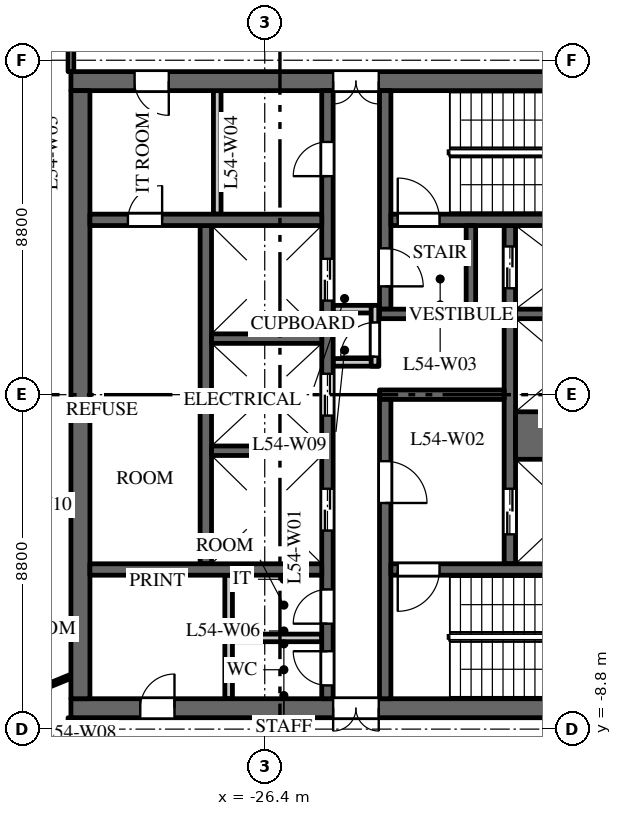
"""IFC4 building model, lengths in metres.
Left out: names, types, materials, properties, quantities, classifications, styles, units other than length and angle.
Written with IfcOpenShell. Run it as: python <this file> out.ifc"""

import sys

from ifc_helpers import new_model, si_unit, direction, frame, frame_2d, origin, place, context, subcontext, project, spatial, rectangle, extrude, element, fill, save


model = new_model("IFC4")
c1 = context("Model", 3, precision=1e-05, world=origin(), true_north=direction((0.0, 1.0)))
c2 = subcontext(c1, "Body", "Model", "MODEL_VIEW")
j1 = project(units=[si_unit("LENGTHUNIT", "METRE"), si_unit("PLANEANGLEUNIT", "RADIAN")], contexts=[c1])
p1 = place(None, origin())
s1 = spatial("IfcSite", under=j1, at=p1, CompositionType="ELEMENT")
p2 = place(p1, origin())
s2 = spatial("IfcBuilding", under=s1, at=p2, CompositionType="ELEMENT")
p3 = place(p2, frame((0.0, 0.0, 257.5)))
s3 = spatial("IfcBuildingStorey", under=s2, at=p3, CompositionType="ELEMENT", Elevation=257.5)
p4 = place(p3, frame((-16.5, 8.25, 0.0), z_axis=(0.0, 0.0, 1.0), x_axis=(-1.0, 0.0, 0.0)))
e1 = element("IfcWall", 1, at=p4, inside=s3, PredefinedType="SHEAR", context=c2, shape_type="SweptSolid", body=[
    extrude(rectangle(XDim=15.0, YDim=0.5, at=frame_2d((7.5, 0.0))), origin(), (0.0, 0.0, 1.0), 3.7),
])
p5 = place(p4, frame((6.9, 0.0, 0.0)))
e2 = element("IfcOpeningElement", 2, at=p5, cuts=e1, PredefinedType="OPENING", context=c2, shape_type="SweptSolid", body=[
    extrude(rectangle(XDim=1.2, YDim=2.1, at=frame_2d((0.6, 1.05))), frame((0.0, 0.26, 0.0), z_axis=(0.0, -1.0, 0.0), x_axis=(1.0, 0.0, 0.0)), (0.0, 0.0, 1.0), 0.52),
])
p6 = place(p4, frame((12.425, 0.0, 0.0)))
e3 = element("IfcOpeningElement", 3, at=p6, cuts=e1, PredefinedType="OPENING", context=c2, shape_type="SweptSolid", body=[
    extrude(rectangle(XDim=0.9, YDim=2.1, at=frame_2d((0.45, 1.05))), frame((0.0, 0.26, 0.0), z_axis=(0.0, -1.0, 0.0), x_axis=(1.0, 0.0, 0.0)), (0.0, 0.0, 1.0), 0.52),
])
p7 = place(p3, frame((-16.5, -8.25, 0.0), z_axis=(0.0, 0.0, 1.0), x_axis=(-1.0, 0.0, 0.0)))
e4 = element("IfcWall", 4, at=p7, inside=s3, PredefinedType="SHEAR", context=c2, shape_type="SweptSolid", body=[
    extrude(rectangle(XDim=15.0, YDim=0.5, at=frame_2d((7.5, 0.0))), origin(), (0.0, 0.0, 1.0), 3.7),
])
p8 = place(p7, frame((6.9, 0.0, 0.0)))
e5 = element("IfcOpeningElement", 5, at=p8, cuts=e4, PredefinedType="OPENING", context=c2, shape_type="SweptSolid", body=[
    extrude(rectangle(XDim=1.2, YDim=2.1, at=frame_2d((0.6, 1.05))), frame((0.0, 0.26, 0.0), z_axis=(0.0, -1.0, 0.0), x_axis=(1.0, 0.0, 0.0)), (0.0, 0.0, 1.0), 0.52),
])
p9 = place(p7, frame((12.275, 0.0, 0.0)))
e6 = element("IfcOpeningElement", 6, at=p9, cuts=e4, PredefinedType="OPENING", context=c2, shape_type="SweptSolid", body=[
    extrude(rectangle(XDim=0.9, YDim=2.1, at=frame_2d((0.45, 1.05))), frame((0.0, 0.26, 0.0), z_axis=(0.0, -1.0, 0.0), x_axis=(1.0, 0.0, 0.0)), (0.0, 0.0, 1.0), 0.52),
])
p10 = place(p3, frame((-27.95, -4.45, 0.0), z_axis=(0.0, 0.0, 1.0), x_axis=(0.0, 1.0, 0.0)))
e7 = element("IfcWall", 7, at=p10, inside=s3, PredefinedType="SHEAR", context=c2, shape_type="SweptSolid", body=[
    extrude(rectangle(XDim=8.9, YDim=0.3, at=frame_2d((4.45, 0.0))), origin(), (0.0, 0.0, 1.0), 3.7),
])
p11 = place(p3, frame((-19.95, -4.45, 0.0), z_axis=(0.0, 0.0, 1.0), x_axis=(0.0, 1.0, 0.0)))
e8 = element("IfcWall", 8, at=p11, inside=s3, PredefinedType="SHEAR", context=c2, shape_type="SweptSolid", body=[
    extrude(rectangle(XDim=8.9, YDim=0.3, at=frame_2d((4.45, 0.0))), origin(), (0.0, 0.0, 1.0), 3.7),
])
p12 = place(p11, frame((0.775, 0.0, 0.0)))
e9 = element("IfcOpeningElement", 9, at=p12, cuts=e8, PredefinedType="OPENING", context=c2, shape_type="SweptSolid", body=[
    extrude(rectangle(XDim=1.2, YDim=2.1, at=frame_2d((0.6, 1.05))), frame((0.0, 0.16, 0.0), z_axis=(0.0, -1.0, 0.0), x_axis=(1.0, 0.0, 0.0)), (0.0, 0.0, 1.0), 0.32),
])
p13 = place(p11, frame((7.25, 0.0, 0.0)))
e10 = element("IfcOpeningElement", 10, at=p13, cuts=e8, PredefinedType="OPENING", context=c2, shape_type="SweptSolid", body=[
    extrude(rectangle(XDim=1.1, YDim=2.1, at=frame_2d((0.55, 1.05))), frame((0.0, 0.16, 0.0), z_axis=(0.0, -1.0, 0.0), x_axis=(1.0, 0.0, 0.0)), (0.0, 0.0, 1.0), 0.32),
])
p14 = place(p3, frame((-24.75, -8.0, 0.0), z_axis=(0.0, 0.0, 1.0), x_axis=(0.0, 1.0, 0.0)))
e11 = element("IfcWall", 11, at=p14, inside=s3, PredefinedType="SHEAR", context=c2, shape_type="SweptSolid", body=[
    extrude(rectangle(XDim=16.0, YDim=0.3, at=frame_2d((8.0, 0.0))), origin(), (0.0, 0.0, 1.0), 3.7),
])
p15 = place(p14, frame((4.425, 0.0, 0.0)))
e12 = element("IfcOpeningElement", 12, at=p15, cuts=e11, PredefinedType="OPENING", context=c2, shape_type="SweptSolid", body=[
    extrude(rectangle(XDim=1.1, YDim=2.1, at=frame_2d((0.55, 1.05))), frame((0.0, 0.16, 0.0), z_axis=(0.0, -1.0, 0.0), x_axis=(1.0, 0.0, 0.0)), (0.0, 0.0, 1.0), 0.32),
])
p16 = place(p14, frame((7.45, 0.0, 0.0)))
e13 = element("IfcOpeningElement", 13, at=p16, cuts=e11, PredefinedType="OPENING", context=c2, shape_type="SweptSolid", body=[
    extrude(rectangle(XDim=1.1, YDim=2.1, at=frame_2d((0.55, 1.05))), frame((0.0, 0.16, 0.0), z_axis=(0.0, -1.0, 0.0), x_axis=(1.0, 0.0, 0.0)), (0.0, 0.0, 1.0), 0.32),
])
p17 = place(p14, frame((10.475, 0.0, 0.0)))
e14 = element("IfcOpeningElement", 14, at=p17, cuts=e11, PredefinedType="OPENING", context=c2, shape_type="SweptSolid", body=[
    extrude(rectangle(XDim=1.1, YDim=2.1, at=frame_2d((0.55, 1.05))), frame((0.0, 0.16, 0.0), z_axis=(0.0, -1.0, 0.0), x_axis=(1.0, 0.0, 0.0)), (0.0, 0.0, 1.0), 0.32),
])
p18 = place(p14, frame((13.75, 0.0, 0.0)))
e15 = element("IfcOpeningElement", 15, at=p18, cuts=e11, PredefinedType="OPENING", context=c2, shape_type="SweptSolid", body=[
    extrude(rectangle(XDim=0.9, YDim=2.1, at=frame_2d((0.45, 1.05))), frame((0.0, 0.16, 0.0), z_axis=(0.0, -1.0, 0.0), x_axis=(1.0, 0.0, 0.0)), (0.0, 0.0, 1.0), 0.32),
])
p19 = place(p14, frame((1.975, 0.0, 0.0)))
e16 = element("IfcOpeningElement", 16, at=p19, cuts=e11, PredefinedType="OPENING", context=c2, shape_type="SweptSolid", body=[
    extrude(rectangle(XDim=0.9, YDim=2.1, at=frame_2d((0.45, 1.05))), frame((0.0, 0.16, 0.0), z_axis=(0.0, -1.0, 0.0), x_axis=(1.0, 0.0, 0.0)), (0.0, 0.0, 1.0), 0.32),
])
p20 = place(p14, frame((0.35, 0.0, 0.0)))
e17 = element("IfcOpeningElement", 17, at=p20, cuts=e11, PredefinedType="OPENING", context=c2, shape_type="SweptSolid", body=[
    extrude(rectangle(XDim=0.9, YDim=2.1, at=frame_2d((0.45, 1.05))), frame((0.0, 0.16, 0.0), z_axis=(0.0, -1.0, 0.0), x_axis=(1.0, 0.0, 0.0)), (0.0, 0.0, 1.0), 0.32),
])
p21 = place(p3, frame((-20.1, 0.0, 0.0), z_axis=(0.0, 0.0, 1.0), x_axis=(-1.0, 0.0, 0.0)))
e18 = element("IfcWall", 18, at=p21, inside=s3, PredefinedType="SHEAR", context=c2, shape_type="SweptSolid", body=[
    extrude(rectangle(XDim=3.28, YDim=0.25, at=frame_2d((1.64, 0.0))), origin(), (0.0, 0.0, 1.0), 3.7),
])
for number, where, z_axis, x_axis in (
    (19, (-23.4, 0.85, 0.0), (0.0, 0.0, 1.0), (-1.0, 0.0, 0.0)),
    (20, (-23.4, 2.25, 0.0), (0.0, 0.0, 1.0), (-1.0, 0.0, 0.0)),
):
    element("IfcWall", number, at=place(p3, frame(where, z_axis=z_axis, x_axis=x_axis)), inside=s3, PredefinedType="PARTITIONING", context=c2, shape_type="SweptSolid", body=[
        extrude(rectangle(XDim=1.2, YDim=0.2, at=frame_2d((0.6, 0.0))), origin(), (0.0, 0.0, 1.0), 3.7),
    ])
p22 = place(p3, frame((-23.5, 0.75, 0.0), z_axis=(0.0, 0.0, 1.0), x_axis=(0.0, 1.0, 0.0)))
e21 = element("IfcWall", 21, at=p22, inside=s3, PredefinedType="PARTITIONING", context=c2, shape_type="SweptSolid", body=[
    extrude(rectangle(XDim=1.6, YDim=0.2, at=frame_2d((0.8, 0.0))), origin(), (0.0, 0.0, 1.0), 3.7),
])
p23 = place(p22, frame((0.25, 0.0, 0.0)))
e22 = element("IfcOpeningElement", 22, at=p23, cuts=e21, PredefinedType="OPENING", context=c2, shape_type="SweptSolid", body=[
    extrude(rectangle(XDim=0.9, YDim=2.1, at=frame_2d((0.45, 1.05))), frame((0.0, 0.11, 0.0), z_axis=(0.0, -1.0, 0.0), x_axis=(1.0, 0.0, 0.0)), (0.0, 0.0, 1.0), 0.22),
])
p24 = place(p3, frame((-31.25, -8.0, 0.0), z_axis=(0.0, 0.0, 1.0), x_axis=(0.0, 1.0, 0.0)))
e23 = element("IfcWall", 23, at=p24, inside=s3, PredefinedType="SHEAR", context=c2, shape_type="SweptSolid", body=[
    extrude(rectangle(XDim=16.0, YDim=0.5, at=frame_2d((8.0, 0.0))), origin(), (0.0, 0.0, 1.0), 3.7),
])
p25 = place(p3, frame((-24.9, 4.6, 0.0), z_axis=(0.0, 0.0, 1.0), x_axis=(-1.0, 0.0, 0.0)))
e24 = element("IfcWall", 24, at=p25, inside=s3, PredefinedType="SHEAR", context=c2, shape_type="SweptSolid", body=[
    extrude(rectangle(XDim=6.1, YDim=0.3, at=frame_2d((3.05, 0.0))), origin(), (0.0, 0.0, 1.0), 3.7),
])
p26 = place(p25, frame((4.2, 0.0, 0.0)))
e25 = element("IfcOpeningElement", 25, at=p26, cuts=e24, PredefinedType="OPENING", context=c2, shape_type="SweptSolid", body=[
    extrude(rectangle(XDim=0.9, YDim=2.1, at=frame_2d((0.45, 1.05))), frame((0.0, 0.16, 0.0), z_axis=(0.0, -1.0, 0.0), x_axis=(1.0, 0.0, 0.0)), (0.0, 0.0, 1.0), 0.32),
])
for number, where, z_axis, x_axis in (
    (26, (-27.65, 4.75, 0.0), (0.0, 0.0, 1.0), (0.0, 1.0, 0.0)),
    (27, (-27.35, -8.0, 0.0), (0.0, 0.0, 1.0), (0.0, 1.0, 0.0)),
):
    element("IfcWall", number, at=place(p3, frame(where, z_axis=z_axis, x_axis=x_axis)), inside=s3, PredefinedType="PARTITIONING", context=c2, shape_type="SweptSolid", body=[
        extrude(rectangle(XDim=3.25, YDim=0.2, at=frame_2d((1.625, 0.0))), origin(), (0.0, 0.0, 1.0), 3.7),
    ])
p27 = place(p3, frame((-24.9, -6.4, 0.0), z_axis=(0.0, 0.0, 1.0), x_axis=(-1.0, 0.0, 0.0)))
e28 = element("IfcWall", 28, at=p27, inside=s3, PredefinedType="PARTITIONING", context=c2, shape_type="SweptSolid", body=[
    extrude(rectangle(XDim=2.35, YDim=0.2, at=frame_2d((1.175, 0.0))), origin(), (0.0, 0.0, 1.0), 3.7),
])
p28 = place(p3, frame((-24.9, -4.6, 0.0), z_axis=(0.0, 0.0, 1.0), x_axis=(-1.0, 0.0, 0.0)))
e29 = element("IfcWall", 29, at=p28, inside=s3, PredefinedType="SHEAR", context=c2, shape_type="SweptSolid", body=[
    extrude(rectangle(XDim=6.1, YDim=0.3, at=frame_2d((3.05, 0.0))), origin(), (0.0, 0.0, 1.0), 3.7),
])
p29 = place(p3, frame((-16.9, -1.075, 0.0), z_axis=(0.0, 0.0, 1.0), x_axis=(-1.0, 0.0, 0.0)))
e30 = element("IfcWall", 30, at=p29, inside=s3, PredefinedType="SHEAR", context=c2, shape_type="SweptSolid", body=[
    extrude(rectangle(XDim=2.9, YDim=1.25, at=frame_2d((1.45, 0.0))), origin(), (0.0, 0.0, 1.0), 3.7),
])
for number, where, z_axis, x_axis in (
    (31, (-16.9, 2.125, 0.0), (0.0, 0.0, 1.0), (-1.0, 0.0, 0.0)),
    (32, (-24.9, -1.475, 0.0), (0.0, 0.0, 1.0), (-1.0, 0.0, 0.0)),
    (33, (-24.9, 1.475, 0.0), (0.0, 0.0, 1.0), (-1.0, 0.0, 0.0)),
):
    element("IfcWall", number, at=place(p3, frame(where, z_axis=z_axis, x_axis=x_axis)), inside=s3, PredefinedType="SHEAR", context=c2, shape_type="SweptSolid", body=[
        extrude(rectangle(XDim=2.9, YDim=0.25, at=frame_2d((1.45, 0.0))), origin(), (0.0, 0.0, 1.0), 3.7),
    ])
p30 = place(p3, frame((-23.23, 2.25, 0.0), z_axis=(0.0, 0.0, 1.0), x_axis=(0.0, 1.0, 0.0)))
e34 = element("IfcWall", 34, at=p30, inside=s3, PredefinedType="SHEAR", context=c2, shape_type="SweptSolid", body=[
    extrude(rectangle(XDim=5.75, YDim=0.3, at=frame_2d((2.875, 0.0))), origin(), (0.0, 0.0, 1.0), 3.7),
])
p31 = place(p30, frame((0.6, 0.0, 0.0)))
e35 = element("IfcOpeningElement", 35, at=p31, cuts=e34, PredefinedType="OPENING", context=c2, shape_type="SweptSolid", body=[
    extrude(rectangle(XDim=1.0, YDim=2.1, at=frame_2d((0.5, 1.05))), frame((0.0, 0.16, 0.0), z_axis=(0.0, -1.0, 0.0), x_axis=(1.0, 0.0, 0.0)), (0.0, 0.0, 1.0), 0.32),
])
p32 = place(p3, frame((-23.23, -8.0, 0.0), z_axis=(0.0, 0.0, 1.0), x_axis=(0.0, 1.0, 0.0)))
e36 = element("IfcWall", 36, at=p32, inside=s3, PredefinedType="SHEAR", context=c2, shape_type="SweptSolid", body=[
    extrude(rectangle(XDim=7.875, YDim=0.3, at=frame_2d((3.938, 0.0))), origin(), (0.0, 0.0, 1.0), 3.7),
])
p33 = place(p32, frame((5.15, 0.0, 0.0)))
e37 = element("IfcOpeningElement", 37, at=p33, cuts=e36, PredefinedType="OPENING", context=c2, shape_type="SweptSolid", body=[
    extrude(rectangle(XDim=1.1, YDim=2.1, at=frame_2d((0.55, 1.05))), frame((0.0, 0.16, 0.0), z_axis=(0.0, -1.0, 0.0), x_axis=(1.0, 0.0, 0.0)), (0.0, 0.0, 1.0), 0.32),
])
p34 = place(p3, frame((-16.9, 4.6, 0.0), z_axis=(0.0, 0.0, 1.0), x_axis=(-1.0, 0.0, 0.0)))
e38 = element("IfcWall", 38, at=p34, inside=s3, PredefinedType="SHEAR", context=c2, shape_type="SweptSolid", body=[
    extrude(rectangle(XDim=6.18, YDim=0.3, at=frame_2d((3.09, 0.0))), origin(), (0.0, 0.0, 1.0), 3.7),
])
p35 = place(p34, frame((4.9, 0.0, 0.0)))
e39 = element("IfcOpeningElement", 39, at=p35, cuts=e38, PredefinedType="OPENING", context=c2, shape_type="SweptSolid", body=[
    extrude(rectangle(XDim=1.1, YDim=2.1, at=frame_2d((0.55, 1.05))), frame((0.0, 0.16, 0.0), z_axis=(0.0, -1.0, 0.0), x_axis=(1.0, 0.0, 0.0)), (0.0, 0.0, 1.0), 0.32),
])
p36 = place(p3, frame((-16.9, -4.6, 0.0), z_axis=(0.0, 0.0, 1.0), x_axis=(-1.0, 0.0, 0.0)))
e40 = element("IfcWall", 40, at=p36, inside=s3, PredefinedType="SHEAR", context=c2, shape_type="SweptSolid", body=[
    extrude(rectangle(XDim=6.18, YDim=0.3, at=frame_2d((3.09, 0.0))), origin(), (0.0, 0.0, 1.0), 3.7),
])
p37 = place(p36, frame((4.9, 0.0, 0.0)))
e41 = element("IfcOpeningElement", 41, at=p37, cuts=e40, PredefinedType="OPENING", context=c2, shape_type="SweptSolid", body=[
    extrude(rectangle(XDim=1.1, YDim=2.1, at=frame_2d((0.55, 1.05))), frame((0.0, 0.16, 0.0), z_axis=(0.0, -1.0, 0.0), x_axis=(1.0, 0.0, 0.0)), (0.0, 0.0, 1.0), 0.32),
])
p38 = place(p3, frame((-20.85, 2.125, 0.0), z_axis=(0.0, 0.0, 1.0), x_axis=(-1.0, 0.0, 0.0)))
e42 = element("IfcWall", 42, at=p38, inside=s3, PredefinedType="SHEAR", context=c2, shape_type="SweptSolid", body=[
    extrude(rectangle(XDim=2.53, YDim=0.25, at=frame_2d((1.265, 0.0))), origin(), (0.0, 0.0, 1.0), 3.7),
])
p39 = place(p3, frame((-20.975, 2.25, 0.0), z_axis=(0.0, 0.0, 1.0), x_axis=(0.0, 1.0, 0.0)))
e43 = element("IfcWall", 43, at=p39, inside=s3, PredefinedType="SHEAR", context=c2, shape_type="SweptSolid", body=[
    extrude(rectangle(XDim=2.2, YDim=0.25, at=frame_2d((1.1, 0.0))), origin(), (0.0, 0.0, 1.0), 3.7),
])
p40 = place(p3, frame((-34.234, -8.53, 0.0), z_axis=(0.0, 0.0, 1.0), x_axis=(0.925344112436, 0.379128307542, 0.0)))
e44 = element("IfcWall", 44, at=p40, inside=s3, PredefinedType="PARTITIONING", context=c2, shape_type="SweptSolid", body=[
    extrude(rectangle(XDim=2.954, YDim=0.1, at=frame_2d((1.477, 0.0))), origin(), (0.0, 0.0, 1.0), 3.0),
])
for number, where, z_axis, x_axis in (
    (45, (-31.5, -10.7, 0.0), (0.0, 0.0, 1.0), (0.0, 1.0, 0.0)),
    (46, (-31.5, 8.5, 0.0), (0.0, 0.0, 1.0), (0.0, 1.0, 0.0)),
):
    element("IfcWall", number, at=place(p3, frame(where, z_axis=z_axis, x_axis=x_axis)), inside=s3, PredefinedType="PARTITIONING", context=c2, shape_type="SweptSolid", body=[
        extrude(rectangle(XDim=2.2, YDim=0.15, at=frame_2d((1.1, 0.0))), origin(), (0.0, 0.0, 1.0), 3.7),
    ])
p41 = place(p12, origin())
e47 = element("IfcDoor", 47, at=p41, inside=s3, OperationType="DOUBLE_DOOR_SLIDING", PredefinedType="DOOR", context=c2, shape_type="SweptSolid", body=[
    extrude(rectangle(XDim=1.2, YDim=2.1, at=frame_2d((0.6, 1.05))), frame((0.0, 0.025, 0.0), z_axis=(0.0, -1.0, 0.0), x_axis=(1.0, 0.0, 0.0)), (0.0, 0.0, 1.0), 0.05),
])
fill(e9, e47)
p42 = place(p13, origin())
e48 = element("IfcDoor", 48, at=p42, inside=s3, OperationType="DOUBLE_DOOR_SLIDING", PredefinedType="DOOR", context=c2, shape_type="SweptSolid", body=[
    extrude(rectangle(XDim=1.1, YDim=2.1, at=frame_2d((0.55, 1.05))), frame((0.0, 0.025, 0.0), z_axis=(0.0, -1.0, 0.0), x_axis=(1.0, 0.0, 0.0)), (0.0, 0.0, 1.0), 0.05),
])
fill(e10, e48)
p43 = place(p15, origin())
e49 = element("IfcDoor", 49, at=p43, inside=s3, OperationType="DOUBLE_DOOR_SLIDING", PredefinedType="DOOR", context=c2, shape_type="SweptSolid", body=[
    extrude(rectangle(XDim=1.1, YDim=2.1, at=frame_2d((0.55, 1.05))), frame((0.0, 0.025, 0.0), z_axis=(0.0, -1.0, 0.0), x_axis=(1.0, 0.0, 0.0)), (0.0, 0.0, 1.0), 0.05),
])
fill(e12, e49)
p44 = place(p16, origin())
e50 = element("IfcDoor", 50, at=p44, inside=s3, OperationType="DOUBLE_DOOR_SLIDING", PredefinedType="DOOR", context=c2, shape_type="SweptSolid", body=[
    extrude(rectangle(XDim=1.1, YDim=2.1, at=frame_2d((0.55, 1.05))), frame((0.0, 0.025, 0.0), z_axis=(0.0, -1.0, 0.0), x_axis=(1.0, 0.0, 0.0)), (0.0, 0.0, 1.0), 0.05),
])
fill(e13, e50)
p45 = place(p17, origin())
e51 = element("IfcDoor", 51, at=p45, inside=s3, OperationType="DOUBLE_DOOR_SLIDING", PredefinedType="DOOR", context=c2, shape_type="SweptSolid", body=[
    extrude(rectangle(XDim=1.1, YDim=2.1, at=frame_2d((0.55, 1.05))), frame((0.0, 0.025, 0.0), z_axis=(0.0, -1.0, 0.0), x_axis=(1.0, 0.0, 0.0)), (0.0, 0.0, 1.0), 0.05),
])
fill(e14, e51)
p46 = place(p35, origin())
e52 = element("IfcDoor", 52, at=p46, inside=s3, OperationType="SINGLE_SWING_RIGHT", PredefinedType="DOOR", context=c2, shape_type="SweptSolid", body=[
    extrude(rectangle(XDim=1.1, YDim=2.1, at=frame_2d((0.55, 1.05))), frame((0.0, 0.025, 0.0), z_axis=(0.0, -1.0, 0.0), x_axis=(1.0, 0.0, 0.0)), (0.0, 0.0, 1.0), 0.05),
])
fill(e39, e52)
p47 = place(p37, origin())
e53 = element("IfcDoor", 53, at=p47, inside=s3, OperationType="SINGLE_SWING_LEFT", PredefinedType="DOOR", context=c2, shape_type="SweptSolid", body=[
    extrude(rectangle(XDim=1.1, YDim=2.1, at=frame_2d((0.55, 1.05))), frame((0.0, 0.025, 0.0), z_axis=(0.0, -1.0, 0.0), x_axis=(1.0, 0.0, 0.0)), (0.0, 0.0, 1.0), 0.05),
])
fill(e41, e53)
p48 = place(p33, origin())
e54 = element("IfcDoor", 54, at=p48, inside=s3, OperationType="SINGLE_SWING_LEFT", PredefinedType="DOOR", context=c2, shape_type="SweptSolid", body=[
    extrude(rectangle(XDim=1.1, YDim=2.1, at=frame_2d((0.55, 1.05))), frame((0.0, 0.025, 0.0), z_axis=(0.0, -1.0, 0.0), x_axis=(1.0, 0.0, 0.0)), (0.0, 0.0, 1.0), 0.05),
])
fill(e37, e54)
p49 = place(p31, origin())
e55 = element("IfcDoor", 55, at=p49, inside=s3, OperationType="SINGLE_SWING_LEFT", PredefinedType="DOOR", context=c2, shape_type="SweptSolid", body=[
    extrude(rectangle(XDim=1.0, YDim=2.1, at=frame_2d((0.5, 1.05))), frame((0.0, 0.025, 0.0), z_axis=(0.0, -1.0, 0.0), x_axis=(1.0, 0.0, 0.0)), (0.0, 0.0, 1.0), 0.05),
])
fill(e35, e55)
p50 = place(p5, origin())
e56 = element("IfcDoor", 56, at=p50, inside=s3, OperationType="DOUBLE_DOOR_DOUBLE_SWING", PredefinedType="DOOR", context=c2, shape_type="SweptSolid", body=[
    extrude(rectangle(XDim=1.2, YDim=2.1, at=frame_2d((0.6, 1.05))), frame((0.0, 0.025, 0.0), z_axis=(0.0, -1.0, 0.0), x_axis=(1.0, 0.0, 0.0)), (0.0, 0.0, 1.0), 0.05),
])
fill(e2, e56)
p51 = place(p8, origin())
e57 = element("IfcDoor", 57, at=p51, inside=s3, OperationType="DOUBLE_DOOR_DOUBLE_SWING", PredefinedType="DOOR", context=c2, shape_type="SweptSolid", body=[
    extrude(rectangle(XDim=1.2, YDim=2.1, at=frame_2d((0.6, 1.05))), frame((0.0, 0.025, 0.0), z_axis=(0.0, -1.0, 0.0), x_axis=(1.0, 0.0, 0.0)), (0.0, 0.0, 1.0), 0.05),
])
fill(e5, e57)
p52 = place(p18, origin())
e58 = element("IfcDoor", 58, at=p52, inside=s3, OperationType="SINGLE_SWING_RIGHT", PredefinedType="DOOR", context=c2, shape_type="SweptSolid", body=[
    extrude(rectangle(XDim=0.9, YDim=2.1, at=frame_2d((0.45, 1.05))), frame((0.0, 0.025, 0.0), z_axis=(0.0, -1.0, 0.0), x_axis=(1.0, 0.0, 0.0)), (0.0, 0.0, 1.0), 0.05),
])
fill(e15, e58)
p53 = place(p6, origin())
e59 = element("IfcDoor", 59, at=p53, inside=s3, OperationType="SINGLE_SWING_RIGHT", PredefinedType="DOOR", context=c2, shape_type="SweptSolid", body=[
    extrude(rectangle(XDim=0.9, YDim=2.1, at=frame_2d((0.45, 1.05))), frame((0.0, 0.025, 0.0), z_axis=(0.0, -1.0, 0.0), x_axis=(1.0, 0.0, 0.0)), (0.0, 0.0, 1.0), 0.05),
])
fill(e3, e59)
p54 = place(p19, origin())
e60 = element("IfcDoor", 60, at=p54, inside=s3, OperationType="SINGLE_SWING_RIGHT", PredefinedType="DOOR", context=c2, shape_type="SweptSolid", body=[
    extrude(rectangle(XDim=0.9, YDim=2.1, at=frame_2d((0.45, 1.05))), frame((0.0, 0.025, 0.0), z_axis=(0.0, -1.0, 0.0), x_axis=(1.0, 0.0, 0.0)), (0.0, 0.0, 1.0), 0.05),
])
fill(e16, e60)
p55 = place(p20, origin())
e61 = element("IfcDoor", 61, at=p55, inside=s3, OperationType="SINGLE_SWING_LEFT", PredefinedType="DOOR", context=c2, shape_type="SweptSolid", body=[
    extrude(rectangle(XDim=0.9, YDim=2.1, at=frame_2d((0.45, 1.05))), frame((0.0, 0.025, 0.0), z_axis=(0.0, -1.0, 0.0), x_axis=(1.0, 0.0, 0.0)), (0.0, 0.0, 1.0), 0.05),
])
fill(e17, e61)
p56 = place(p9, origin())
e62 = element("IfcDoor", 62, at=p56, inside=s3, OperationType="SINGLE_SWING_LEFT", PredefinedType="DOOR", context=c2, shape_type="SweptSolid", body=[
    extrude(rectangle(XDim=0.9, YDim=2.1, at=frame_2d((0.45, 1.05))), frame((0.0, 0.025, 0.0), z_axis=(0.0, -1.0, 0.0), x_axis=(1.0, 0.0, 0.0)), (0.0, 0.0, 1.0), 0.05),
])
fill(e6, e62)
p57 = place(p23, origin())
e63 = element("IfcDoor", 63, at=p57, inside=s3, OperationType="SINGLE_SWING_RIGHT", PredefinedType="DOOR", context=c2, shape_type="SweptSolid", body=[
    extrude(rectangle(XDim=0.9, YDim=2.1, at=frame_2d((0.45, 1.05))), frame((0.0, 0.025, 0.0), z_axis=(0.0, -1.0, 0.0), x_axis=(1.0, 0.0, 0.0)), (0.0, 0.0, 1.0), 0.05),
])
fill(e22, e63)
p58 = place(p26, origin())
e64 = element("IfcDoor", 64, at=p58, inside=s3, OperationType="SINGLE_SWING_LEFT", PredefinedType="DOOR", context=c2, shape_type="SweptSolid", body=[
    extrude(rectangle(XDim=0.9, YDim=2.1, at=frame_2d((0.45, 1.05))), frame((0.0, 0.025, 0.0), z_axis=(0.0, -1.0, 0.0), x_axis=(1.0, 0.0, 0.0)), (0.0, 0.0, 1.0), 0.05),
])
fill(e25, e64)
save(model, sys.argv[1])
